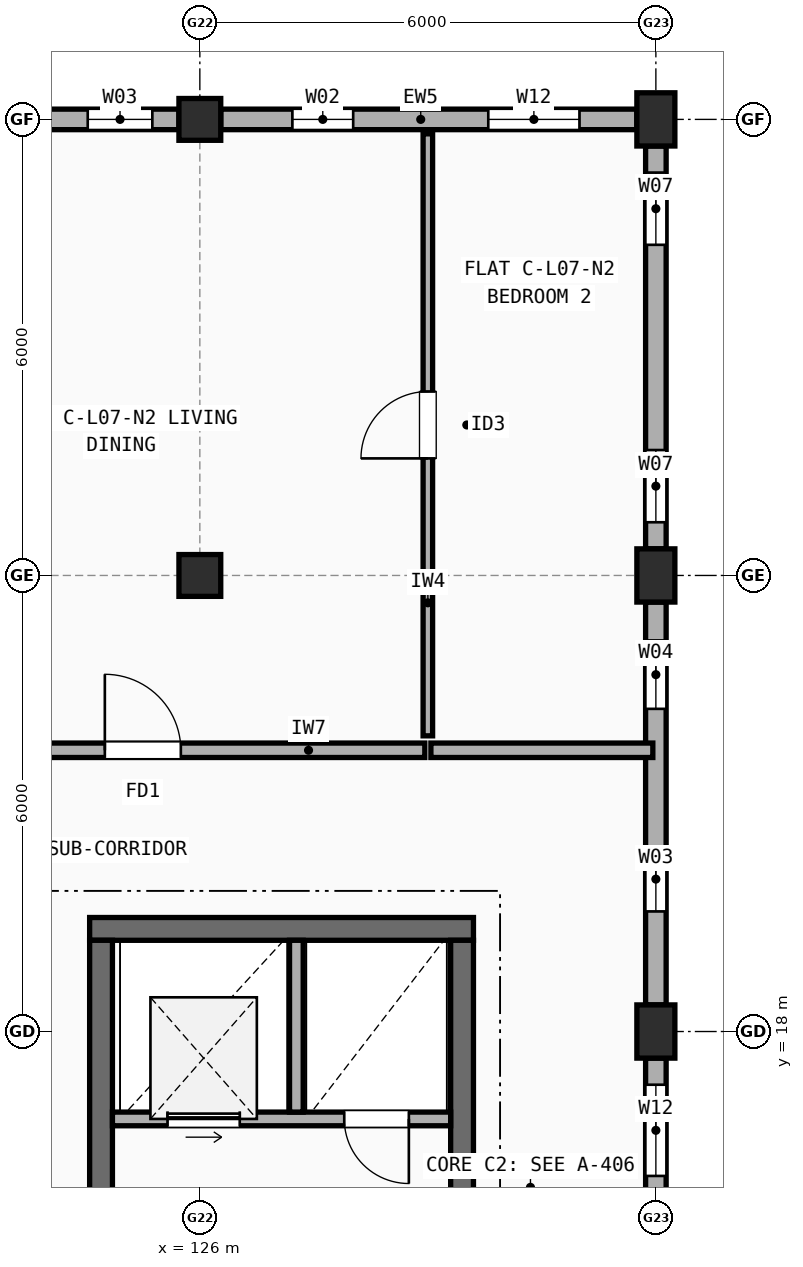
"""IFC4 building model, lengths in metres.
Left out: names, types, materials, properties, quantities, classifications, styles, units other than length and angle.
Written with IfcOpenShell. Run it as: python <this file> out.ifc"""

import sys

from ifc_helpers import new_model, si_unit, direction, frame, frame_2d, origin, origin_2d, place, context, subcontext, project, spatial, rectangle, extrude, element, fill, save


model = new_model("IFC4")
c1 = context("Model", 3, precision=1e-05, world=origin(), true_north=direction((0.0, 1.0)))
c2 = subcontext(c1, "Body", "Model", "MODEL_VIEW")
j1 = project(units=[si_unit("LENGTHUNIT", "METRE"), si_unit("PLANEANGLEUNIT", "RADIAN")], contexts=[c1])
p1 = place(None, origin())
s1 = spatial("IfcSite", under=j1, at=p1, CompositionType="ELEMENT")
p2 = place(p1, origin())
s2 = spatial("IfcBuilding", under=s1, at=p2, CompositionType="ELEMENT")
p3 = place(p2, frame((0.0, 0.0, 23.7)))
s3 = spatial("IfcBuildingStorey", under=s2, at=p3, CompositionType="ELEMENT", Elevation=23.7)
for number, where, z_axis, x_axis in (
    (1, (126.0, 24.0, 0.0), (0.0, 0.0, 1.0), (1.0, 0.0, 0.0)),
    (2, (126.0, 30.0, 0.0), (0.0, 0.0, 1.0), (1.0, 0.0, 0.0)),
):
    element("IfcColumn", number, at=place(p3, frame(where, z_axis=z_axis, x_axis=x_axis)), inside=s3, PredefinedType="COLUMN", context=c2, shape_type="SweptSolid", body=[
        extrude(rectangle(XDim=0.55, YDim=0.55, at=origin_2d()), origin(), (0.0, 0.0, 1.0), 2.975),
    ])
for number, where, z_axis, x_axis in (
    (3, (132.0, 18.0, 0.0), (0.0, 0.0, 1.0), (1.0, 0.0, 0.0)),
    (4, (132.0, 24.0, 0.0), (0.0, 0.0, 1.0), (1.0, 0.0, 0.0)),
    (5, (132.0, 30.0, 0.0), (0.0, 0.0, 1.0), (1.0, 0.0, 0.0)),
):
    element("IfcColumn", number, at=place(p3, frame(where, z_axis=z_axis, x_axis=x_axis)), inside=s3, PredefinedType="COLUMN", context=c2, shape_type="SweptSolid", body=[
        extrude(rectangle(XDim=0.5, YDim=0.7, at=origin_2d()), origin(), (0.0, 0.0, 1.0), 2.975),
    ])
p4 = place(p3, frame((132.0, 12.35, 0.0), z_axis=(0.0, 0.0, 1.0), x_axis=(0.0, 1.0, 0.0)))
e6 = element("IfcWall", 6, at=p4, inside=s3, PredefinedType="STANDARD", context=c2, shape_type="SweptSolid", body=[
    extrude(rectangle(XDim=5.3, YDim=0.27, at=frame_2d((2.65, 0.0))), origin(), (0.0, 0.0, 1.0), 2.457),
])
p5 = place(p4, frame((0.35, 0.0, 0.9)))
e7 = element("IfcOpeningElement", 7, at=p5, cuts=e6, PredefinedType="OPENING", context=c2, shape_type="SweptSolid", body=[
    extrude(rectangle(XDim=1.2, YDim=1.35, at=frame_2d((0.6, 0.675))), frame((0.0, 0.145, 0.0), z_axis=(0.0, -1.0, 0.0), x_axis=(1.0, 0.0, 0.0)), (0.0, 0.0, 1.0), 0.29),
])
p6 = place(p4, frame((3.75, 0.0, 0.9)))
e8 = element("IfcOpeningElement", 8, at=p6, cuts=e6, PredefinedType="OPENING", context=c2, shape_type="SweptSolid", body=[
    extrude(rectangle(XDim=1.2, YDim=1.35, at=frame_2d((0.6, 0.675))), frame((0.0, 0.145, 0.0), z_axis=(0.0, -1.0, 0.0), x_axis=(1.0, 0.0, 0.0)), (0.0, 0.0, 1.0), 0.29),
])
p7 = place(p3, frame((132.0, 18.35, 0.0), z_axis=(0.0, 0.0, 1.0), x_axis=(0.0, 1.0, 0.0)))
e9 = element("IfcWall", 9, at=p7, inside=s3, PredefinedType="STANDARD", context=c2, shape_type="SweptSolid", body=[
    extrude(rectangle(XDim=5.3, YDim=0.27, at=frame_2d((2.65, 0.0))), origin(), (0.0, 0.0, 1.0), 2.457),
])
p8 = place(p7, frame((1.23, 0.0, 0.9)))
e10 = element("IfcOpeningElement", 10, at=p8, cuts=e9, PredefinedType="OPENING", context=c2, shape_type="SweptSolid", body=[
    extrude(rectangle(XDim=0.85, YDim=1.25, at=frame_2d((0.425, 0.625))), frame((0.0, 0.145, 0.0), z_axis=(0.0, -1.0, 0.0), x_axis=(1.0, 0.0, 0.0)), (0.0, 0.0, 1.0), 0.29),
])
p9 = place(p7, frame((3.895, 0.0, 0.9)))
e11 = element("IfcOpeningElement", 11, at=p9, cuts=e9, PredefinedType="OPENING", context=c2, shape_type="SweptSolid", body=[
    extrude(rectangle(XDim=0.9, YDim=1.3, at=frame_2d((0.45, 0.65))), frame((0.0, 0.145, 0.0), z_axis=(0.0, -1.0, 0.0), x_axis=(1.0, 0.0, 0.0)), (0.0, 0.0, 1.0), 0.29),
])
p10 = place(p3, frame((132.0, 24.35, 0.0), z_axis=(0.0, 0.0, 1.0), x_axis=(0.0, 1.0, 0.0)))
e12 = element("IfcWall", 12, at=p10, inside=s3, PredefinedType="STANDARD", context=c2, shape_type="SweptSolid", body=[
    extrude(rectangle(XDim=5.3, YDim=0.27, at=frame_2d((2.65, 0.0))), origin(), (0.0, 0.0, 1.0), 2.457),
])
p11 = place(p10, frame((0.35, 0.0, 0.9)))
e13 = element("IfcOpeningElement", 13, at=p11, cuts=e12, PredefinedType="OPENING", context=c2, shape_type="SweptSolid", body=[
    extrude(rectangle(XDim=0.95, YDim=1.35, at=frame_2d((0.475, 0.675))), frame((0.0, 0.145, 0.0), z_axis=(0.0, -1.0, 0.0), x_axis=(1.0, 0.0, 0.0)), (0.0, 0.0, 1.0), 0.29),
])
p12 = place(p10, frame((4.0, 0.0, 0.9)))
e14 = element("IfcOpeningElement", 14, at=p12, cuts=e12, PredefinedType="OPENING", context=c2, shape_type="SweptSolid", body=[
    extrude(rectangle(XDim=0.95, YDim=1.35, at=frame_2d((0.475, 0.675))), frame((0.0, 0.145, 0.0), z_axis=(0.0, -1.0, 0.0), x_axis=(1.0, 0.0, 0.0)), (0.0, 0.0, 1.0), 0.29),
])
p13 = place(p3, frame((131.75, 30.0, 0.0), z_axis=(0.0, 0.0, 1.0), x_axis=(-1.0, 0.0, 0.0)))
e15 = element("IfcWall", 15, at=p13, inside=s3, PredefinedType="STANDARD", context=c2, shape_type="SweptSolid", body=[
    extrude(rectangle(XDim=5.475, YDim=0.27, at=frame_2d((2.738, 0.0))), origin(), (0.0, 0.0, 1.0), 2.457),
])
p14 = place(p13, frame((0.755, 0.0, 0.9)))
e16 = element("IfcOpeningElement", 16, at=p14, cuts=e15, PredefinedType="OPENING", context=c2, shape_type="SweptSolid", body=[
    extrude(rectangle(XDim=1.2, YDim=1.35, at=frame_2d((0.6, 0.675))), frame((0.0, 0.145, 0.0), z_axis=(0.0, -1.0, 0.0), x_axis=(1.0, 0.0, 0.0)), (0.0, 0.0, 1.0), 0.29),
])
p15 = place(p13, frame((3.732, 0.0, 0.9)))
e17 = element("IfcOpeningElement", 17, at=p15, cuts=e15, PredefinedType="OPENING", context=c2, shape_type="SweptSolid", body=[
    extrude(rectangle(XDim=0.8, YDim=1.2, at=frame_2d((0.4, 0.6))), frame((0.0, 0.145, 0.0), z_axis=(0.0, -1.0, 0.0), x_axis=(1.0, 0.0, 0.0)), (0.0, 0.0, 1.0), 0.29),
])
p16 = place(p3, frame((125.725, 30.0, 0.0), z_axis=(0.0, 0.0, 1.0), x_axis=(-1.0, 0.0, 0.0)))
e18 = element("IfcWall", 18, at=p16, inside=s3, PredefinedType="STANDARD", context=c2, shape_type="SweptSolid", body=[
    extrude(rectangle(XDim=5.45, YDim=0.27, at=frame_2d((2.725, 0.0))), origin(), (0.0, 0.0, 1.0), 2.457),
])
p17 = place(p16, frame((0.35, 0.0, 0.9)))
e19 = element("IfcOpeningElement", 19, at=p17, cuts=e18, PredefinedType="OPENING", context=c2, shape_type="SweptSolid", body=[
    extrude(rectangle(XDim=0.85, YDim=1.25, at=frame_2d((0.425, 0.625))), frame((0.0, 0.145, 0.0), z_axis=(0.0, -1.0, 0.0), x_axis=(1.0, 0.0, 0.0)), (0.0, 0.0, 1.0), 0.29),
])
p18 = place(p16, frame((2.985, 0.0, 0.9)))
e20 = element("IfcOpeningElement", 20, at=p18, cuts=e18, PredefinedType="OPENING", context=c2, shape_type="SweptSolid", body=[
    extrude(rectangle(XDim=0.85, YDim=1.25, at=frame_2d((0.425, 0.625))), frame((0.0, 0.145, 0.0), z_axis=(0.0, -1.0, 0.0), x_axis=(1.0, 0.0, 0.0)), (0.0, 0.0, 1.0), 0.29),
])
p19 = place(p3, frame((129.6, 19.35, 0.0), z_axis=(0.0, 0.0, 1.0), x_axis=(-1.0, 0.0, 0.0)))
e21 = element("IfcWall", 21, at=p19, inside=s3, PredefinedType="SHEAR", context=c2, shape_type="SweptSolid", body=[
    extrude(rectangle(XDim=5.05, YDim=0.3, at=frame_2d((2.525, 0.0))), origin(), (0.0, 0.0, 1.0), 2.975),
])
p20 = place(p3, frame((129.45, 12.75, 0.0), z_axis=(0.0, 0.0, 1.0), x_axis=(0.0, 1.0, 0.0)))
e22 = element("IfcWall", 22, at=p20, inside=s3, PredefinedType="SHEAR", context=c2, shape_type="SweptSolid", body=[
    extrude(rectangle(XDim=6.45, YDim=0.3, at=frame_2d((3.225, 0.0))), origin(), (0.0, 0.0, 1.0), 2.975),
])
p21 = place(p3, frame((124.7, 15.65, 0.0), z_axis=(0.0, 0.0, 1.0), x_axis=(0.0, 1.0, 0.0)))
e23 = element("IfcWall", 23, at=p21, inside=s3, PredefinedType="SHEAR", context=c2, shape_type="SweptSolid", body=[
    extrude(rectangle(XDim=3.55, YDim=0.3, at=frame_2d((1.775, 0.0))), origin(), (0.0, 0.0, 1.0), 2.975),
])
p22 = place(p3, frame((124.85, 16.85, 0.0), z_axis=(0.0, 0.0, 1.0), x_axis=(1.0, 0.0, 0.0)))
e24 = element("IfcWall", 24, at=p22, inside=s3, PredefinedType="SOLIDWALL", context=c2, shape_type="SweptSolid", body=[
    extrude(rectangle(XDim=4.45, YDim=0.18, at=frame_2d((2.225, 0.0))), origin(), (0.0, 0.0, 1.0), 2.975),
])
p23 = place(p22, frame((0.725, 0.0, 0.0)))
e25 = element("IfcOpeningElement", 25, at=p23, cuts=e24, PredefinedType="OPENING", context=c2, shape_type="SweptSolid", body=[
    extrude(rectangle(XDim=0.95, YDim=2.15, at=frame_2d((0.475, 1.075))), frame((0.0, 0.1, 0.0), z_axis=(0.0, -1.0, 0.0), x_axis=(1.0, 0.0, 0.0)), (0.0, 0.0, 1.0), 0.2),
])
p24 = place(p22, frame((3.05, 0.0, 0.0)))
e26 = element("IfcOpeningElement", 26, at=p24, cuts=e24, PredefinedType="OPENING", context=c2, shape_type="SweptSolid", body=[
    extrude(rectangle(XDim=0.85, YDim=2.1, at=frame_2d((0.425, 1.05))), frame((0.0, 0.1, 0.0), z_axis=(0.0, -1.0, 0.0), x_axis=(1.0, 0.0, 0.0)), (0.0, 0.0, 1.0), 0.2),
])
p25 = place(p3, frame((127.27, 16.94, 0.0), z_axis=(0.0, 0.0, 1.0), x_axis=(0.0, 1.0, 0.0)))
e27 = element("IfcWall", 27, at=p25, inside=s3, PredefinedType="SOLIDWALL", context=c2, shape_type="SweptSolid", body=[
    extrude(rectangle(XDim=2.26, YDim=0.18, at=frame_2d((1.13, 0.0))), origin(), (0.0, 0.0, 1.0), 2.975),
])
p26 = place(p3, frame((121.54, 21.7, 0.0), z_axis=(0.0, 0.0, 1.0), x_axis=(1.0, 0.0, 0.0)))
e28 = element("IfcWall", 28, at=p26, inside=s3, PredefinedType="SOLIDWALL", context=c2, shape_type="SweptSolid", body=[
    extrude(rectangle(XDim=7.42, YDim=0.19, at=frame_2d((3.71, 0.0))), origin(), (0.0, 0.0, 1.0), 2.975),
])
p27 = place(p26, frame((3.21, 0.0, 0.0)))
e29 = element("IfcOpeningElement", 29, at=p27, cuts=e28, PredefinedType="OPENING", context=c2, shape_type="SweptSolid", body=[
    extrude(rectangle(XDim=1.0, YDim=2.15, at=frame_2d((0.5, 1.075))), frame((0.0, 0.105, 0.0), z_axis=(0.0, -1.0, 0.0), x_axis=(1.0, 0.0, 0.0)), (0.0, 0.0, 1.0), 0.21),
])
p28 = place(p3, frame((129.04, 21.7, 0.0), z_axis=(0.0, 0.0, 1.0), x_axis=(1.0, 0.0, 0.0)))
e30 = element("IfcWall", 30, at=p28, inside=s3, PredefinedType="SOLIDWALL", context=c2, shape_type="SweptSolid", body=[
    extrude(rectangle(XDim=2.92, YDim=0.19, at=frame_2d((1.46, 0.0))), origin(), (0.0, 0.0, 1.0), 2.457),
])
p29 = place(p3, frame((129.0, 21.89, 0.0), z_axis=(0.0, 0.0, 1.0), x_axis=(0.0, 1.0, 0.0)))
e31 = element("IfcWall", 31, at=p29, inside=s3, PredefinedType="PARTITIONING", context=c2, shape_type="SweptSolid", body=[
    extrude(rectangle(XDim=7.92, YDim=0.125, at=frame_2d((3.96, 0.0))), origin(), (0.0, 0.0, 1.0), 2.548),
])
p30 = place(p29, frame((3.65, 0.0, 0.0)))
e32 = element("IfcOpeningElement", 32, at=p30, cuts=e31, PredefinedType="OPENING", context=c2, shape_type="SweptSolid", body=[
    extrude(rectangle(XDim=0.88, YDim=2.1, at=frame_2d((0.44, 1.05))), frame((0.0, 0.073, 0.0), z_axis=(0.0, -1.0, 0.0), x_axis=(1.0, 0.0, 0.0)), (0.0, 0.0, 1.0), 0.145),
])
p31 = place(p6, origin())
e33 = element("IfcWindow", 33, at=p31, inside=s3, PartitioningType="SINGLE_PANEL", PredefinedType="WINDOW", context=c2, shape_type="SweptSolid", body=[
    extrude(rectangle(XDim=1.2, YDim=1.35, at=frame_2d((0.6, 0.675))), frame((0.0, 0.03, 0.0), z_axis=(0.0, -1.0, 0.0), x_axis=(1.0, 0.0, 0.0)), (0.0, 0.0, 1.0), 0.06),
])
fill(e8, e33)
p32 = place(p8, origin())
e34 = element("IfcWindow", 34, at=p32, inside=s3, PartitioningType="SINGLE_PANEL", PredefinedType="WINDOW", context=c2, shape_type="SweptSolid", body=[
    extrude(rectangle(XDim=0.85, YDim=1.25, at=frame_2d((0.425, 0.625))), frame((0.0, 0.03, 0.0), z_axis=(0.0, -1.0, 0.0), x_axis=(1.0, 0.0, 0.0)), (0.0, 0.0, 1.0), 0.06),
])
fill(e10, e34)
p33 = place(p9, origin())
e35 = element("IfcWindow", 35, at=p33, inside=s3, PartitioningType="SINGLE_PANEL", PredefinedType="WINDOW", context=c2, shape_type="SweptSolid", body=[
    extrude(rectangle(XDim=0.9, YDim=1.3, at=frame_2d((0.45, 0.65))), frame((0.0, 0.03, 0.0), z_axis=(0.0, -1.0, 0.0), x_axis=(1.0, 0.0, 0.0)), (0.0, 0.0, 1.0), 0.06),
])
fill(e11, e35)
p34 = place(p11, origin())
e36 = element("IfcWindow", 36, at=p34, inside=s3, PartitioningType="SINGLE_PANEL", PredefinedType="WINDOW", context=c2, shape_type="SweptSolid", body=[
    extrude(rectangle(XDim=0.95, YDim=1.35, at=frame_2d((0.475, 0.675))), frame((0.0, 0.03, 0.0), z_axis=(0.0, -1.0, 0.0), x_axis=(1.0, 0.0, 0.0)), (0.0, 0.0, 1.0), 0.06),
])
fill(e13, e36)
p35 = place(p12, origin())
e37 = element("IfcWindow", 37, at=p35, inside=s3, PartitioningType="SINGLE_PANEL", PredefinedType="WINDOW", context=c2, shape_type="SweptSolid", body=[
    extrude(rectangle(XDim=0.95, YDim=1.35, at=frame_2d((0.475, 0.675))), frame((0.0, 0.03, 0.0), z_axis=(0.0, -1.0, 0.0), x_axis=(1.0, 0.0, 0.0)), (0.0, 0.0, 1.0), 0.06),
])
fill(e14, e37)
p36 = place(p14, origin())
e38 = element("IfcWindow", 38, at=p36, inside=s3, PartitioningType="SINGLE_PANEL", PredefinedType="WINDOW", context=c2, shape_type="SweptSolid", body=[
    extrude(rectangle(XDim=1.2, YDim=1.35, at=frame_2d((0.6, 0.675))), frame((0.0, 0.03, 0.0), z_axis=(0.0, -1.0, 0.0), x_axis=(1.0, 0.0, 0.0)), (0.0, 0.0, 1.0), 0.06),
])
fill(e16, e38)
p37 = place(p15, origin())
e39 = element("IfcWindow", 39, at=p37, inside=s3, PartitioningType="SINGLE_PANEL", PredefinedType="WINDOW", context=c2, shape_type="SweptSolid", body=[
    extrude(rectangle(XDim=0.8, YDim=1.2, at=frame_2d((0.4, 0.6))), frame((0.0, 0.03, 0.0), z_axis=(0.0, -1.0, 0.0), x_axis=(1.0, 0.0, 0.0)), (0.0, 0.0, 1.0), 0.06),
])
fill(e17, e39)
p38 = place(p17, origin())
e40 = element("IfcWindow", 40, at=p38, inside=s3, PartitioningType="SINGLE_PANEL", PredefinedType="WINDOW", context=c2, shape_type="SweptSolid", body=[
    extrude(rectangle(XDim=0.85, YDim=1.25, at=frame_2d((0.425, 0.625))), frame((0.0, 0.03, 0.0), z_axis=(0.0, -1.0, 0.0), x_axis=(1.0, 0.0, 0.0)), (0.0, 0.0, 1.0), 0.06),
])
fill(e19, e40)
p39 = place(p23, origin())
e41 = element("IfcDoor", 41, at=p39, inside=s3, OperationType="SLIDING_TO_LEFT", PredefinedType="DOOR", context=c2, shape_type="SweptSolid", body=[
    extrude(rectangle(XDim=0.95, YDim=2.15, at=frame_2d((0.475, 1.075))), frame((0.0, 0.025, 0.0), z_axis=(0.0, -1.0, 0.0), x_axis=(1.0, 0.0, 0.0)), (0.0, 0.0, 1.0), 0.05),
])
fill(e25, e41)
p40 = place(p24, frame((0.85, 0.0, 0.0), z_axis=(0.0, 0.0, 1.0), x_axis=(-1.0, 0.0, 0.0)))
e42 = element("IfcDoor", 42, at=p40, inside=s3, OperationType="SINGLE_SWING_RIGHT", PredefinedType="DOOR", context=c2, shape_type="SweptSolid", body=[
    extrude(rectangle(XDim=0.85, YDim=2.1, at=frame_2d((0.425, 1.05))), frame((0.0, 0.025, 0.0), z_axis=(0.0, -1.0, 0.0), x_axis=(1.0, 0.0, 0.0)), (0.0, 0.0, 1.0), 0.05),
])
fill(e26, e42)
p41 = place(p27, origin())
e43 = element("IfcDoor", 43, at=p41, inside=s3, OperationType="SINGLE_SWING_LEFT", PredefinedType="DOOR", context=c2, shape_type="SweptSolid", body=[
    extrude(rectangle(XDim=1.0, YDim=2.15, at=frame_2d((0.5, 1.075))), frame((0.0, 0.025, 0.0), z_axis=(0.0, -1.0, 0.0), x_axis=(1.0, 0.0, 0.0)), (0.0, 0.0, 1.0), 0.05),
])
fill(e29, e43)
p42 = place(p30, origin())
e44 = element("IfcDoor", 44, at=p42, inside=s3, OperationType="SINGLE_SWING_LEFT", PredefinedType="DOOR", context=c2, shape_type="SweptSolid", body=[
    extrude(rectangle(XDim=0.88, YDim=2.1, at=frame_2d((0.44, 1.05))), frame((0.0, 0.025, 0.0), z_axis=(0.0, -1.0, 0.0), x_axis=(1.0, 0.0, 0.0)), (0.0, 0.0, 1.0), 0.05),
])
fill(e32, e44)
save(model, sys.argv[1])
